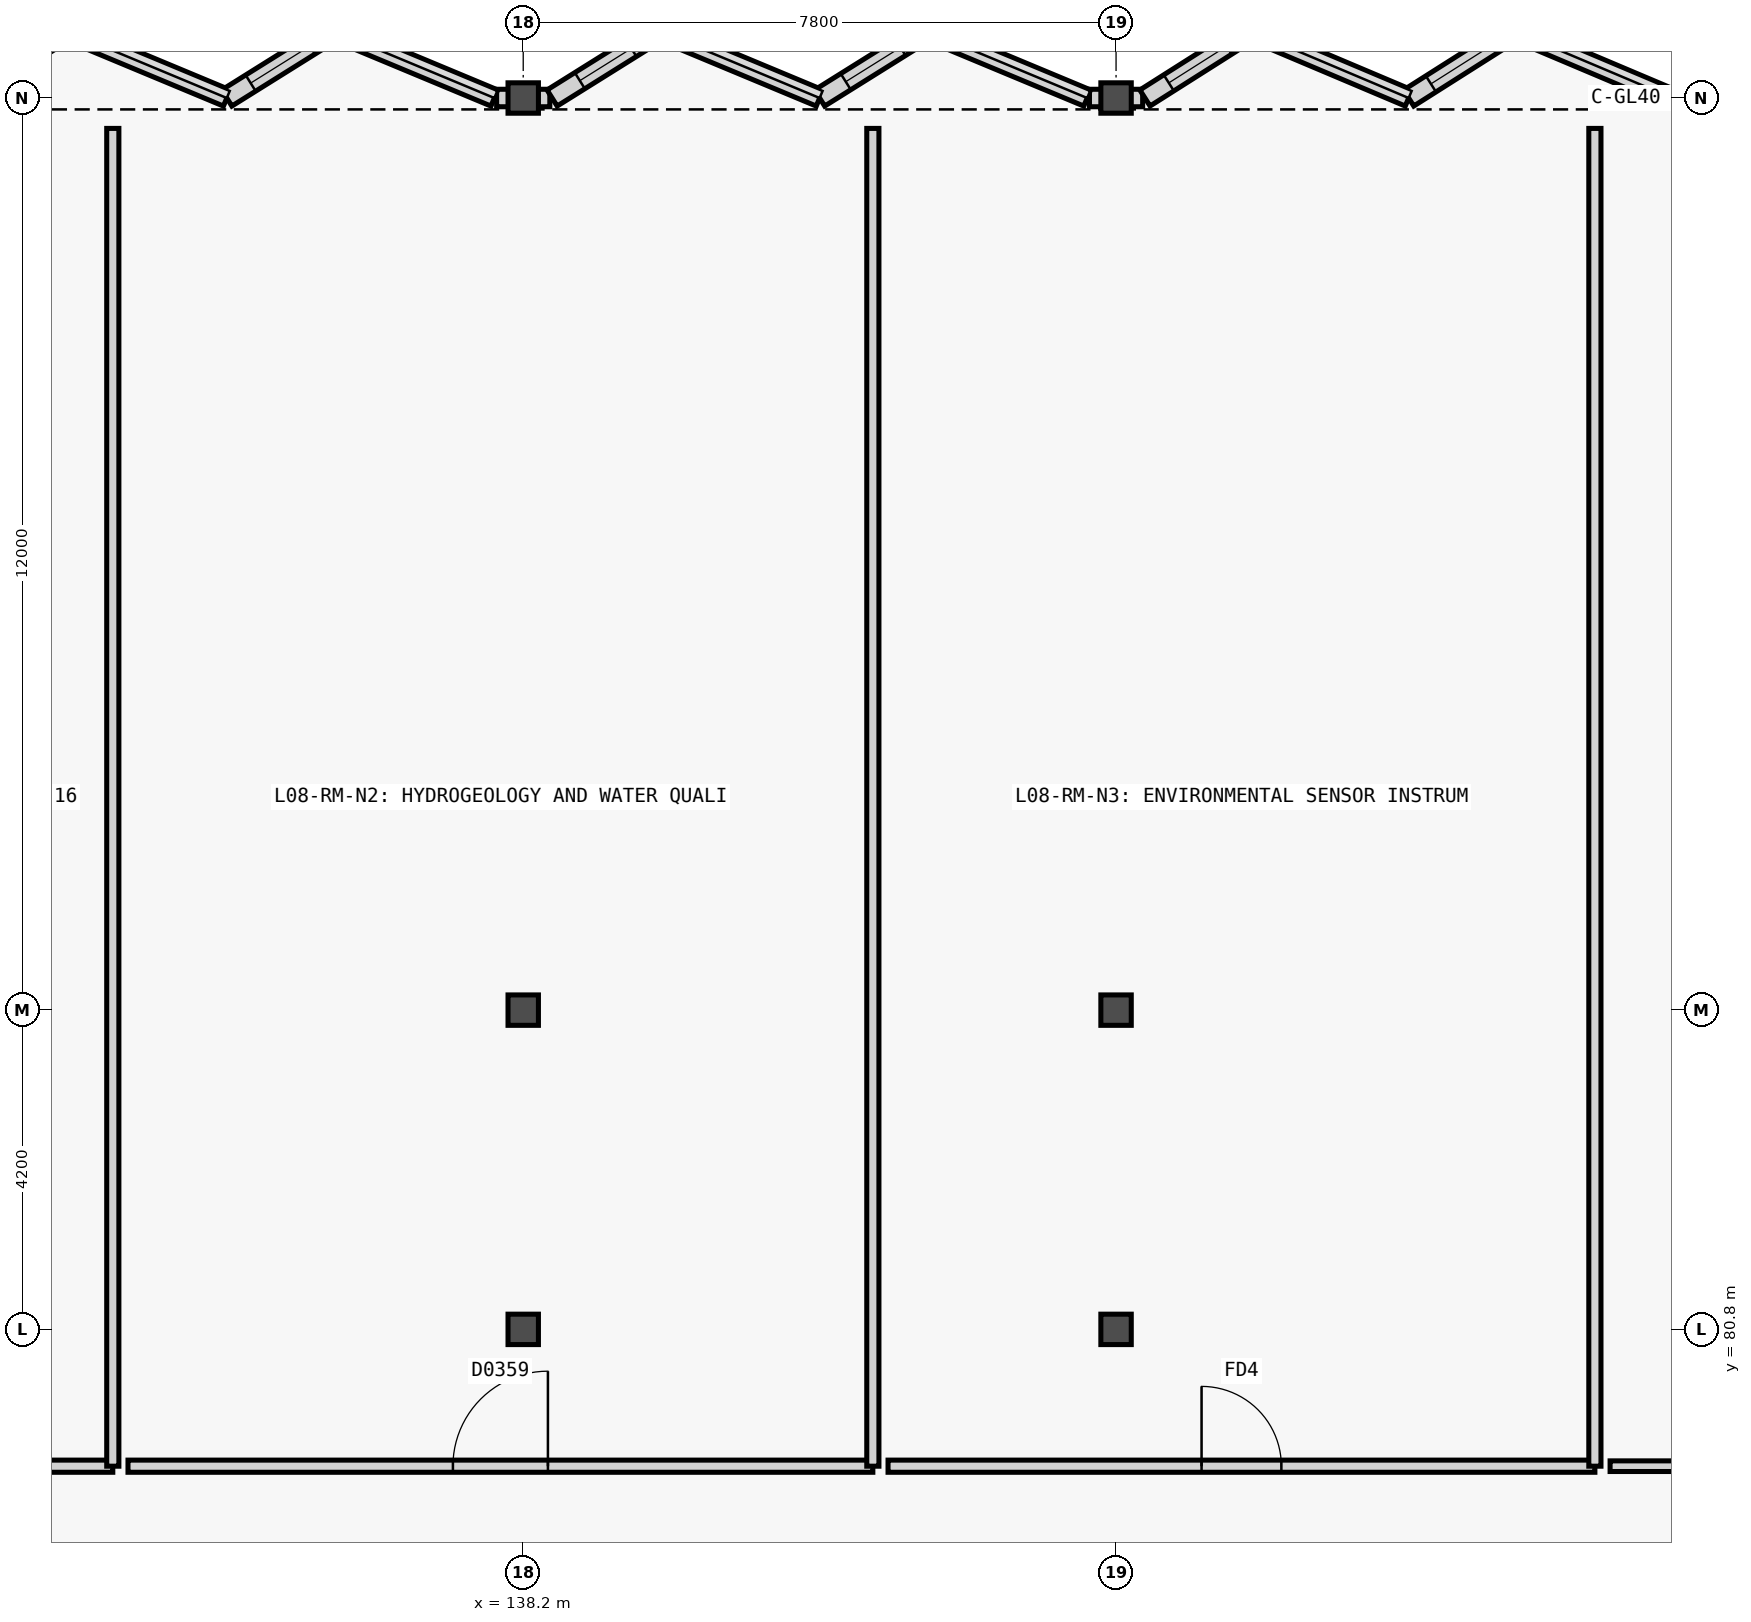
"""IFC4 building model, lengths in metres.
Left out: names, types, materials, properties, quantities, classifications, styles, units other than length and angle.
Written with IfcOpenShell. Run it as: python <this file> out.ifc"""

import sys

from ifc_helpers import new_model, si_unit, direction, frame, frame_2d, origin, origin_2d, place, context, subcontext, project, spatial, rectangle, extrude, element, fill, save


model = new_model("IFC4")
c1 = context("Model", 3, precision=1e-05, world=origin(), true_north=direction((0.0, 1.0)))
c2 = subcontext(c1, "Body", "Model", "MODEL_VIEW")
j1 = project(units=[si_unit("LENGTHUNIT", "METRE"), si_unit("PLANEANGLEUNIT", "RADIAN")], contexts=[c1])
p1 = place(None, origin())
s1 = spatial("IfcSite", under=j1, at=p1, CompositionType="ELEMENT")
p2 = place(p1, origin())
s2 = spatial("IfcBuilding", under=s1, at=p2, CompositionType="ELEMENT")
p3 = place(p2, frame((0.0, 0.0, 32.4)))
s3 = spatial("IfcBuildingStorey", under=s2, at=p3, CompositionType="ELEMENT", Elevation=32.4)
for number, where, z_axis, x_axis in (
    (1, (138.2, 80.8, 0.0), (0.0, 0.0, 1.0), (1.0, 0.0, 0.0)),
    (2, (138.2, 85.0, 0.0), (0.0, 0.0, 1.0), (1.0, 0.0, 0.0)),
    (3, (138.2, 97.0, 0.0), (0.0, 0.0, 1.0), (1.0, 0.0, 0.0)),
    (4, (146.0, 80.8, 0.0), (0.0, 0.0, 1.0), (1.0, 0.0, 0.0)),
    (5, (146.0, 85.0, 0.0), (0.0, 0.0, 1.0), (1.0, 0.0, 0.0)),
    (6, (146.0, 97.0, 0.0), (0.0, 0.0, 1.0), (1.0, 0.0, 0.0)),
):
    element("IfcColumn", number, at=place(p3, frame(where, z_axis=z_axis, x_axis=x_axis)), inside=s3, PredefinedType="COLUMN", context=c2, shape_type="SweptSolid", body=[
        extrude(rectangle(XDim=0.4, YDim=0.4, at=origin_2d()), origin(), (0.0, 0.0, 1.0), 3.6),
    ])
p4 = place(p3, frame((137.85, 97.0, 0.0), z_axis=(0.0, 0.0, 1.0), x_axis=(1.0, 0.0, 0.0)))
e7 = element("IfcWall", 7, at=p4, inside=s3, PredefinedType="SOLIDWALL", context=c2, shape_type="SweptSolid", body=[
    extrude(rectangle(XDim=0.35, YDim=0.23, at=frame_2d((0.175, 0.0))), origin(), (0.0, 0.0, 1.0), 3.36),
])
for number, where, z_axis, x_axis in (
    (8, (138.2, 97.0, 0.0), (0.0, 0.0, 1.0), (1.0, 0.0, 0.0)),
    (9, (145.65, 97.0, 0.0), (0.0, 0.0, 1.0), (1.0, 0.0, 0.0)),
    (10, (146.0, 97.0, 0.0), (0.0, 0.0, 1.0), (1.0, 0.0, 0.0)),
):
    element("IfcWall", number, at=place(p3, frame(where, z_axis=z_axis, x_axis=x_axis)), inside=s3, PredefinedType="SOLIDWALL", context=c2, shape_type="SweptSolid", body=[
        extrude(rectangle(XDim=0.35, YDim=0.23, at=frame_2d((0.175, 0.0))), origin(), (0.0, 0.0, 1.0), 3.36),
    ])
p5 = place(p3, frame((130.78, 97.0, 0.0), z_axis=(0.0, 0.0, 1.0), x_axis=(0.848023086369, 0.529959286158, 0.0)))
e11 = element("IfcWall", 11, at=p5, inside=s3, PredefinedType="SOLIDWALL", context=c2, shape_type="SweptSolid", body=[
    extrude(rectangle(XDim=1.66, YDim=0.25, at=frame_2d((0.83, 0.0))), origin(), (0.0, 0.0, 1.0), 3.36),
])
p6 = place(p5, frame((0.44, 0.0, 0.82)))
e12 = element("IfcOpeningElement", 12, at=p6, cuts=e11, PredefinedType="OPENING", context=c2, shape_type="SweptSolid", body=[
    extrude(rectangle(XDim=0.78, YDim=1.3, at=frame_2d((0.39, 0.65))), frame((0.0, 0.135, 0.0), z_axis=(0.0, -1.0, 0.0), x_axis=(1.0, 0.0, 0.0)), (0.0, 0.0, 1.0), 0.27),
])
p7 = place(p3, frame((132.188, 97.88, 0.0), z_axis=(0.0, 0.0, 1.0), x_axis=(0.92309902008, -0.384562347517, 0.0)))
e13 = element("IfcWall", 13, at=p7, inside=s3, PredefinedType="SOLIDWALL", context=c2, shape_type="SweptSolid", body=[
    extrude(rectangle(XDim=2.288, YDim=0.23, at=frame_2d((1.144, 0.0))), origin(), (0.0, 0.0, 1.0), 3.36),
])
p8 = place(p3, frame((134.3, 97.0, 0.0), z_axis=(0.0, 0.0, 1.0), x_axis=(0.848023086369, 0.529959286158, 0.0)))
e14 = element("IfcWall", 14, at=p8, inside=s3, PredefinedType="SOLIDWALL", context=c2, shape_type="SweptSolid", body=[
    extrude(rectangle(XDim=1.66, YDim=0.25, at=frame_2d((0.83, 0.0))), origin(), (0.0, 0.0, 1.0), 3.36),
])
p9 = place(p8, frame((0.37, 0.0, 0.82)))
e15 = element("IfcOpeningElement", 15, at=p9, cuts=e14, PredefinedType="OPENING", context=c2, shape_type="SweptSolid", body=[
    extrude(rectangle(XDim=0.92, YDim=1.38, at=frame_2d((0.46, 0.69))), frame((0.0, 0.135, 0.0), z_axis=(0.0, -1.0, 0.0), x_axis=(1.0, 0.0, 0.0)), (0.0, 0.0, 1.0), 0.27),
])
p10 = place(p3, frame((135.708, 97.88, 0.0), z_axis=(0.0, 0.0, 1.0), x_axis=(0.92309902008, -0.384562347517, 0.0)))
e16 = element("IfcWall", 16, at=p10, inside=s3, PredefinedType="SOLIDWALL", context=c2, shape_type="SweptSolid", body=[
    extrude(rectangle(XDim=2.288, YDim=0.23, at=frame_2d((1.144, 0.0))), origin(), (0.0, 0.0, 1.0), 3.36),
])
p11 = place(p3, frame((138.58, 97.0, 0.0), z_axis=(0.0, 0.0, 1.0), x_axis=(0.848023086369, 0.529959286158, 0.0)))
e17 = element("IfcWall", 17, at=p11, inside=s3, PredefinedType="SOLIDWALL", context=c2, shape_type="SweptSolid", body=[
    extrude(rectangle(XDim=1.66, YDim=0.25, at=frame_2d((0.83, 0.0))), origin(), (0.0, 0.0, 1.0), 3.36),
])
p12 = place(p11, frame((0.43, 0.0, 0.82)))
e18 = element("IfcOpeningElement", 18, at=p12, cuts=e17, PredefinedType="OPENING", context=c2, shape_type="SweptSolid", body=[
    extrude(rectangle(XDim=0.8, YDim=1.35, at=frame_2d((0.4, 0.675))), frame((0.0, 0.135, 0.0), z_axis=(0.0, -1.0, 0.0), x_axis=(1.0, 0.0, 0.0)), (0.0, 0.0, 1.0), 0.27),
])
p13 = place(p3, frame((139.988, 97.88, 0.0), z_axis=(0.0, 0.0, 1.0), x_axis=(0.92309902008, -0.384562347517, 0.0)))
e19 = element("IfcWall", 19, at=p13, inside=s3, PredefinedType="SOLIDWALL", context=c2, shape_type="SweptSolid", body=[
    extrude(rectangle(XDim=2.288, YDim=0.23, at=frame_2d((1.144, 0.0))), origin(), (0.0, 0.0, 1.0), 3.36),
])
p14 = place(p3, frame((142.1, 97.0, 0.0), z_axis=(0.0, 0.0, 1.0), x_axis=(0.848023086369, 0.529959286158, 0.0)))
e20 = element("IfcWall", 20, at=p14, inside=s3, PredefinedType="SOLIDWALL", context=c2, shape_type="SweptSolid", body=[
    extrude(rectangle(XDim=1.66, YDim=0.25, at=frame_2d((0.83, 0.0))), origin(), (0.0, 0.0, 1.0), 3.36),
])
p15 = place(p14, frame((0.405, 0.0, 0.82)))
e21 = element("IfcOpeningElement", 21, at=p15, cuts=e20, PredefinedType="OPENING", context=c2, shape_type="SweptSolid", body=[
    extrude(rectangle(XDim=0.85, YDim=1.4, at=frame_2d((0.425, 0.7))), frame((0.0, 0.135, 0.0), z_axis=(0.0, -1.0, 0.0), x_axis=(1.0, 0.0, 0.0)), (0.0, 0.0, 1.0), 0.27),
])
p16 = place(p3, frame((143.508, 97.88, 0.0), z_axis=(0.0, 0.0, 1.0), x_axis=(0.92309902008, -0.384562347517, 0.0)))
e22 = element("IfcWall", 22, at=p16, inside=s3, PredefinedType="SOLIDWALL", context=c2, shape_type="SweptSolid", body=[
    extrude(rectangle(XDim=2.288, YDim=0.23, at=frame_2d((1.144, 0.0))), origin(), (0.0, 0.0, 1.0), 3.36),
])
p17 = place(p3, frame((146.38, 97.0, 0.0), z_axis=(0.0, 0.0, 1.0), x_axis=(0.844626536799, 0.535355968805, 0.0)))
e23 = element("IfcWall", 23, at=p17, inside=s3, PredefinedType="SOLIDWALL", context=c2, shape_type="SweptSolid", body=[
    extrude(rectangle(XDim=1.644, YDim=0.25, at=frame_2d((0.822, 0.0))), origin(), (0.0, 0.0, 1.0), 3.36),
])
p18 = place(p17, frame((0.372, 0.0, 0.82)))
e24 = element("IfcOpeningElement", 24, at=p18, cuts=e23, PredefinedType="OPENING", context=c2, shape_type="SweptSolid", body=[
    extrude(rectangle(XDim=0.9, YDim=1.45, at=frame_2d((0.45, 0.725))), frame((0.0, 0.135, 0.0), z_axis=(0.0, -1.0, 0.0), x_axis=(1.0, 0.0, 0.0)), (0.0, 0.0, 1.0), 0.27),
])
p19 = place(p3, frame((147.768, 97.88, 0.0), z_axis=(0.0, 0.0, 1.0), x_axis=(0.921122216024, -0.389273506866, 0.0)))
e25 = element("IfcWall", 25, at=p19, inside=s3, PredefinedType="SOLIDWALL", context=c2, shape_type="SweptSolid", body=[
    extrude(rectangle(XDim=2.26, YDim=0.23, at=frame_2d((1.13, 0.0))), origin(), (0.0, 0.0, 1.0), 3.36),
])
p20 = place(p3, frame((149.85, 97.0, 0.0), z_axis=(0.0, 0.0, 1.0), x_axis=(0.844583954912, 0.535423143976, 0.0)))
e26 = element("IfcWall", 26, at=p20, inside=s3, PredefinedType="SOLIDWALL", context=c2, shape_type="SweptSolid", body=[
    extrude(rectangle(XDim=1.643, YDim=0.25, at=frame_2d((0.822, 0.0))), origin(), (0.0, 0.0, 1.0), 3.36),
])
p21 = place(p20, frame((0.347, 0.0, 0.82)))
e27 = element("IfcOpeningElement", 27, at=p21, cuts=e26, PredefinedType="OPENING", context=c2, shape_type="SweptSolid", body=[
    extrude(rectangle(XDim=0.95, YDim=1.5, at=frame_2d((0.475, 0.75))), frame((0.0, 0.135, 0.0), z_axis=(0.0, -1.0, 0.0), x_axis=(1.0, 0.0, 0.0)), (0.0, 0.0, 1.0), 0.27),
])
p22 = place(p3, frame((151.238, 97.88, 0.0), z_axis=(0.0, 0.0, 1.0), x_axis=(0.921122216024, -0.389273506866, 0.0)))
e28 = element("IfcWall", 28, at=p22, inside=s3, PredefinedType="SOLIDWALL", context=c2, shape_type="SweptSolid", body=[
    extrude(rectangle(XDim=2.26, YDim=0.23, at=frame_2d((1.13, 0.0))), origin(), (0.0, 0.0, 1.0), 3.36),
])
p23 = place(p3, frame((122.8, 79.0, 0.0), z_axis=(0.0, 0.0, 1.0), x_axis=(1.0, 0.0, 0.0)))
e29 = element("IfcWall", 29, at=p23, inside=s3, PredefinedType="PARTITIONING", context=c2, shape_type="SweptSolid", body=[
    extrude(rectangle(XDim=10.0, YDim=0.16, at=frame_2d((5.0, 0.0))), origin(), (0.0, 0.0, 1.0), 3.34),
])
p24 = place(p23, frame((4.475, 0.0, 0.0)))
e30 = element("IfcOpeningElement", 30, at=p24, cuts=e29, PredefinedType="OPENING", context=c2, shape_type="SweptSolid", body=[
    extrude(rectangle(XDim=1.05, YDim=2.15, at=frame_2d((0.525, 1.075))), frame((0.0, 0.09, 0.0), z_axis=(0.0, -1.0, 0.0), x_axis=(1.0, 0.0, 0.0)), (0.0, 0.0, 1.0), 0.18),
])
p25 = place(p3, frame((132.8, 79.0, 0.0), z_axis=(0.0, 0.0, 1.0), x_axis=(0.0, 1.0, 0.0)))
e31 = element("IfcWall", 31, at=p25, inside=s3, PredefinedType="PARTITIONING", context=c2, shape_type="SweptSolid", body=[
    extrude(rectangle(XDim=17.6, YDim=0.16, at=frame_2d((8.8, 0.0))), origin(), (0.0, 0.0, 1.0), 3.34),
])
p26 = place(p3, frame((133.0, 79.0, 0.0), z_axis=(0.0, 0.0, 1.0), x_axis=(1.0, 0.0, 0.0)))
e32 = element("IfcWall", 32, at=p26, inside=s3, PredefinedType="PARTITIONING", context=c2, shape_type="SweptSolid", body=[
    extrude(rectangle(XDim=9.8, YDim=0.16, at=frame_2d((4.9, 0.0))), origin(), (0.0, 0.0, 1.0), 3.34),
])
p27 = place(p26, frame((4.275, 0.0, 0.0)))
e33 = element("IfcOpeningElement", 33, at=p27, cuts=e32, PredefinedType="OPENING", context=c2, shape_type="SweptSolid", body=[
    extrude(rectangle(XDim=1.25, YDim=2.2, at=frame_2d((0.625, 1.1))), frame((0.0, 0.09, 0.0), z_axis=(0.0, -1.0, 0.0), x_axis=(1.0, 0.0, 0.0)), (0.0, 0.0, 1.0), 0.18),
])
p28 = place(p3, frame((142.8, 79.0, 0.0), z_axis=(0.0, 0.0, 1.0), x_axis=(0.0, 1.0, 0.0)))
e34 = element("IfcWall", 34, at=p28, inside=s3, PredefinedType="PARTITIONING", context=c2, shape_type="SweptSolid", body=[
    extrude(rectangle(XDim=17.6, YDim=0.16, at=frame_2d((8.8, 0.0))), origin(), (0.0, 0.0, 1.0), 3.34),
])
p29 = place(p3, frame((143.0, 79.0, 0.0), z_axis=(0.0, 0.0, 1.0), x_axis=(1.0, 0.0, 0.0)))
e35 = element("IfcWall", 35, at=p29, inside=s3, PredefinedType="PARTITIONING", context=c2, shape_type="SweptSolid", body=[
    extrude(rectangle(XDim=9.3, YDim=0.16, at=frame_2d((4.65, 0.0))), origin(), (0.0, 0.0, 1.0), 3.34),
])
p30 = place(p29, frame((4.125, 0.0, 0.0)))
e36 = element("IfcOpeningElement", 36, at=p30, cuts=e35, PredefinedType="OPENING", context=c2, shape_type="SweptSolid", body=[
    extrude(rectangle(XDim=1.05, YDim=2.15, at=frame_2d((0.525, 1.075))), frame((0.0, 0.09, 0.0), z_axis=(0.0, -1.0, 0.0), x_axis=(1.0, 0.0, 0.0)), (0.0, 0.0, 1.0), 0.18),
])
p31 = place(p3, frame((152.3, 79.0, 0.0), z_axis=(0.0, 0.0, 1.0), x_axis=(0.0, 1.0, 0.0)))
e37 = element("IfcWall", 37, at=p31, inside=s3, PredefinedType="PARTITIONING", context=c2, shape_type="SweptSolid", body=[
    extrude(rectangle(XDim=17.6, YDim=0.16, at=frame_2d((8.8, 0.0))), origin(), (0.0, 0.0, 1.0), 3.34),
])
p32 = place(p3, frame((152.5, 79.0, 0.0), z_axis=(0.0, 0.0, 1.0), x_axis=(1.0, 0.0, 0.0)))
e38 = element("IfcWall", 38, at=p32, inside=s3, PredefinedType="PARTITIONING", context=c2, shape_type="SweptSolid", body=[
    extrude(rectangle(XDim=8.1, YDim=0.14, at=frame_2d((4.05, 0.0))), origin(), (0.0, 0.0, 1.0), 3.34),
])
p33 = place(p32, frame((3.59, 0.0, 0.0)))
e39 = element("IfcOpeningElement", 39, at=p33, cuts=e38, PredefinedType="OPENING", context=c2, shape_type="SweptSolid", body=[
    extrude(rectangle(XDim=0.92, YDim=2.15, at=frame_2d((0.46, 1.075))), frame((0.0, 0.08, 0.0), z_axis=(0.0, -1.0, 0.0), x_axis=(1.0, 0.0, 0.0)), (0.0, 0.0, 1.0), 0.16),
])
p34 = place(p9, origin())
e40 = element("IfcWindow", 40, at=p34, inside=s3, PartitioningType="SINGLE_PANEL", PredefinedType="WINDOW", context=c2, shape_type="SweptSolid", body=[
    extrude(rectangle(XDim=0.92, YDim=1.38, at=frame_2d((0.46, 0.69))), frame((0.0, 0.03, 0.0), z_axis=(0.0, -1.0, 0.0), x_axis=(1.0, 0.0, 0.0)), (0.0, 0.0, 1.0), 0.06),
])
fill(e15, e40)
p35 = place(p12, origin())
e41 = element("IfcWindow", 41, at=p35, inside=s3, PartitioningType="SINGLE_PANEL", PredefinedType="WINDOW", context=c2, shape_type="SweptSolid", body=[
    extrude(rectangle(XDim=0.8, YDim=1.35, at=frame_2d((0.4, 0.675))), frame((0.0, 0.03, 0.0), z_axis=(0.0, -1.0, 0.0), x_axis=(1.0, 0.0, 0.0)), (0.0, 0.0, 1.0), 0.06),
])
fill(e18, e41)
p36 = place(p15, origin())
e42 = element("IfcWindow", 42, at=p36, inside=s3, PartitioningType="SINGLE_PANEL", PredefinedType="WINDOW", context=c2, shape_type="SweptSolid", body=[
    extrude(rectangle(XDim=0.85, YDim=1.4, at=frame_2d((0.425, 0.7))), frame((0.0, 0.03, 0.0), z_axis=(0.0, -1.0, 0.0), x_axis=(1.0, 0.0, 0.0)), (0.0, 0.0, 1.0), 0.06),
])
fill(e21, e42)
p37 = place(p18, origin())
e43 = element("IfcWindow", 43, at=p37, inside=s3, PartitioningType="SINGLE_PANEL", PredefinedType="WINDOW", context=c2, shape_type="SweptSolid", body=[
    extrude(rectangle(XDim=0.9, YDim=1.45, at=frame_2d((0.45, 0.725))), frame((0.0, 0.03, 0.0), z_axis=(0.0, -1.0, 0.0), x_axis=(1.0, 0.0, 0.0)), (0.0, 0.0, 1.0), 0.06),
])
fill(e24, e43)
p38 = place(p21, origin())
e44 = element("IfcWindow", 44, at=p38, inside=s3, PartitioningType="SINGLE_PANEL", PredefinedType="WINDOW", context=c2, shape_type="SweptSolid", body=[
    extrude(rectangle(XDim=0.95, YDim=1.5, at=frame_2d((0.475, 0.75))), frame((0.0, 0.03, 0.0), z_axis=(0.0, -1.0, 0.0), x_axis=(1.0, 0.0, 0.0)), (0.0, 0.0, 1.0), 0.06),
])
fill(e27, e44)
p39 = place(p27, origin())
e45 = element("IfcDoor", 45, at=p39, inside=s3, OperationType="SINGLE_SWING_RIGHT", PredefinedType="DOOR", context=c2, shape_type="SweptSolid", body=[
    extrude(rectangle(XDim=1.25, YDim=2.2, at=frame_2d((0.625, 1.1))), frame((0.0, 0.025, 0.0), z_axis=(0.0, -1.0, 0.0), x_axis=(1.0, 0.0, 0.0)), (0.0, 0.0, 1.0), 0.05),
])
fill(e33, e45)
p40 = place(p30, origin())
e46 = element("IfcDoor", 46, at=p40, inside=s3, OperationType="SINGLE_SWING_LEFT", PredefinedType="DOOR", context=c2, shape_type="SweptSolid", body=[
    extrude(rectangle(XDim=1.05, YDim=2.15, at=frame_2d((0.525, 1.075))), frame((0.0, 0.025, 0.0), z_axis=(0.0, -1.0, 0.0), x_axis=(1.0, 0.0, 0.0)), (0.0, 0.0, 1.0), 0.05),
])
fill(e36, e46)
save(model, sys.argv[1])
